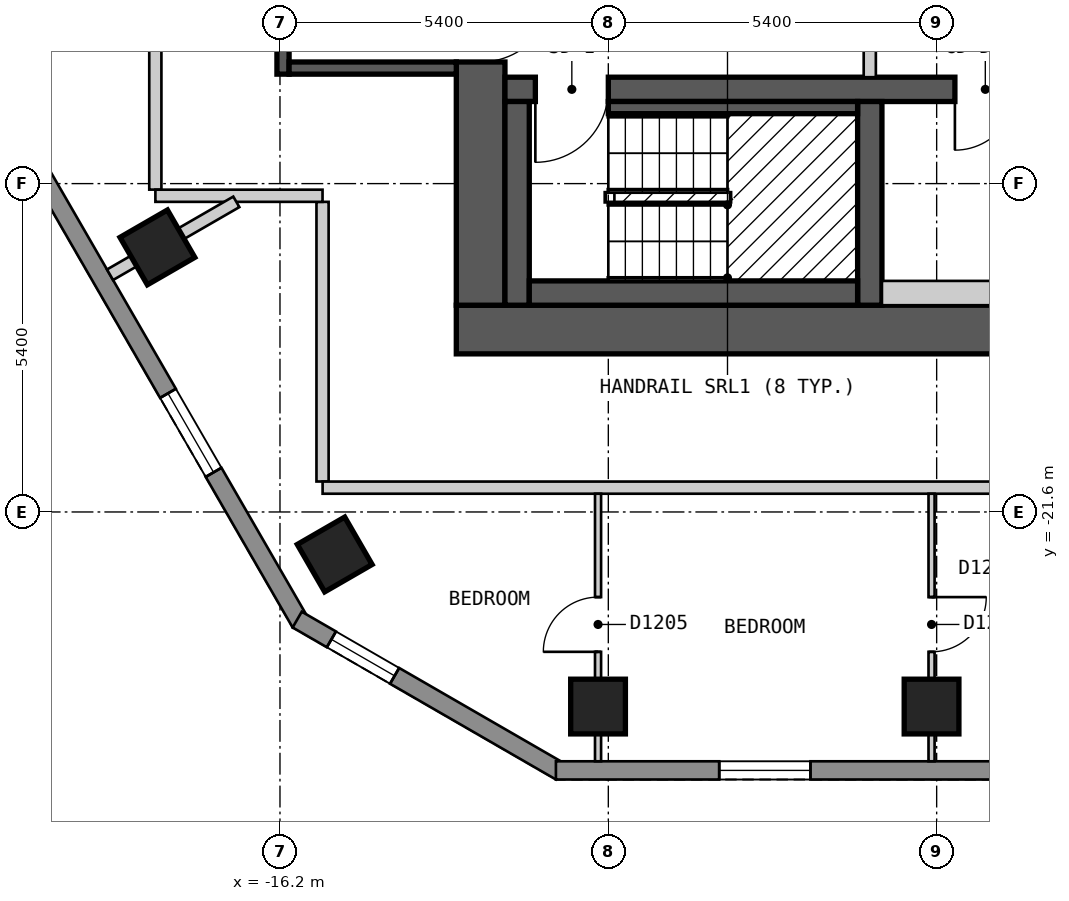
"""IFC4 building model, lengths in metres.
Left out: names, types, materials, properties, quantities, classifications, styles, units other than length and angle.
Written with IfcOpenShell. Run it as: python <this file> out.ifc"""

import sys

from ifc_helpers import new_model, si_unit, direction, frame, frame_2d, origin, origin_2d, place, context, subcontext, project, spatial, polyline, rectangle, outline, extrude, element, fill, save


model = new_model("IFC4")
c1 = context("Model", 3, precision=1e-05, world=origin(), true_north=direction((0.0, 1.0)))
c2 = subcontext(c1, "Body", "Model", "MODEL_VIEW")
j1 = project(units=[si_unit("LENGTHUNIT", "METRE"), si_unit("PLANEANGLEUNIT", "RADIAN")], contexts=[c1])
p1 = place(None, origin())
s1 = spatial("IfcSite", under=j1, at=p1, CompositionType="ELEMENT")
p2 = place(p1, origin())
s2 = spatial("IfcBuilding", under=s1, at=p2, CompositionType="ELEMENT")
p3 = place(p2, frame((0.0, 0.0, 129.6)))
s3 = spatial("IfcBuildingStorey", under=s2, at=p3, CompositionType="ELEMENT", Elevation=129.6)
for number, where, z_axis, x_axis in (
    (1, (-18.216, -17.249, 0.0), (0.0, 0.0, 1.0), (0.5, -0.866, 0.0)),
    (2, (-15.3, -22.299, 0.0), (0.0, 0.0, 1.0), (0.5, -0.866, 0.0)),
    (3, (-10.969, -24.8, 0.0), (0.0, 0.0, 1.0), (1.0, 0.0, 0.0)),
    (4, (-5.484, -24.8, 0.0), (0.0, 0.0, 1.0), (1.0, 0.0, 0.0)),
):
    element("IfcColumn", number, at=place(p3, frame(where, z_axis=z_axis, x_axis=x_axis)), inside=s3, PredefinedType="COLUMN", context=c2, shape_type="SweptSolid", body=[
        extrude(rectangle(XDim=0.9, YDim=0.9, at=origin_2d()), origin(), (0.0, 0.0, 1.0), 3.0),
    ])
p4 = place(p3, frame((-13.3, -18.6, 0.0), z_axis=(0.0, 0.0, 1.0), x_axis=(1.0, 0.0, 0.0)))
e5 = element("IfcWall", 5, at=p4, inside=s3, PredefinedType="SHEAR", context=c2, shape_type="SweptSolid", body=[
    extrude(rectangle(XDim=26.6, YDim=0.8, at=frame_2d((13.3, 0.0))), origin(), (0.0, 0.0, 1.0), 2.7),
])
p5 = place(p3, frame((-12.9, -18.2, 0.0), z_axis=(0.0, 0.0, 1.0), x_axis=(0.0, 1.0, 0.0)))
e6 = element("IfcWall", 6, at=p5, inside=s3, PredefinedType="SHEAR", context=c2, shape_type="SweptSolid", body=[
    extrude(rectangle(XDim=12.4, YDim=0.8, at=frame_2d((6.2, 0.0))), origin(), (0.0, 0.0, 1.0), 2.7),
])
p6 = place(p5, frame((4.0, 0.0, 0.0)))
e7 = element("IfcOpeningElement", 7, at=p6, cuts=e6, PredefinedType="OPENING", context=c2, shape_type="SweptSolid", body=[
    extrude(rectangle(XDim=1.2, YDim=2.1, at=frame_2d((0.6, 1.05))), frame((0.0, 0.41, 0.0), z_axis=(0.0, -1.0, 0.0), x_axis=(1.0, 0.0, 0.0)), (0.0, 0.0, 1.0), 0.82),
])
p7 = place(p3, frame((-12.5, -14.65, 0.0), z_axis=(0.0, 0.0, 1.0), x_axis=(1.0, 0.0, 0.0)))
e8 = element("IfcWall", 8, at=p7, inside=s3, PredefinedType="SHEAR", context=c2, shape_type="SweptSolid", body=[
    extrude(rectangle(XDim=25.0, YDim=0.4, at=frame_2d((12.5, 0.0))), origin(), (0.0, 0.0, 1.0), 2.7),
])
p8 = place(p7, frame((1.7, 0.0, 0.0), z_axis=(0.0, 0.0, 1.0), x_axis=(-1.0, 0.0, 0.0)))
e9 = element("IfcOpeningElement", 9, at=p8, cuts=e8, PredefinedType="OPENING", context=c2, shape_type="SweptSolid", body=[
    extrude(rectangle(XDim=1.2, YDim=2.1, at=frame_2d((0.6, 1.05))), frame((0.0, 0.21, 0.0), z_axis=(0.0, -1.0, 0.0), x_axis=(1.0, 0.0, 0.0)), (0.0, 0.0, 1.0), 0.42),
])
p9 = place(p7, frame((24.55, 0.0, 0.0), z_axis=(0.0, 0.0, 1.0), x_axis=(-1.0, 0.0, 0.0)))
e10 = element("IfcOpeningElement", 10, at=p9, cuts=e8, PredefinedType="OPENING", context=c2, shape_type="SweptSolid", body=[
    extrude(rectangle(XDim=1.2, YDim=2.1, at=frame_2d((0.6, 1.05))), frame((0.0, 0.21, 0.0), z_axis=(0.0, -1.0, 0.0), x_axis=(1.0, 0.0, 0.0)), (0.0, 0.0, 1.0), 0.42),
])
p10 = place(p7, frame((8.4, 0.0, 0.0), z_axis=(0.0, 0.0, 1.0), x_axis=(-1.0, 0.0, 0.0)))
e11 = element("IfcOpeningElement", 11, at=p10, cuts=e8, PredefinedType="OPENING", context=c2, shape_type="SweptSolid", body=[
    extrude(rectangle(XDim=1.0, YDim=2.1, at=frame_2d((0.5, 1.05))), frame((0.0, 0.21, 0.0), z_axis=(0.0, -1.0, 0.0), x_axis=(1.0, 0.0, 0.0)), (0.0, 0.0, 1.0), 0.42),
])
p11 = place(p7, frame((11.15, 0.0, 0.0), z_axis=(0.0, 0.0, 1.0), x_axis=(-1.0, 0.0, 0.0)))
e12 = element("IfcOpeningElement", 12, at=p11, cuts=e8, PredefinedType="OPENING", context=c2, shape_type="SweptSolid", body=[
    extrude(rectangle(XDim=0.9, YDim=2.1, at=frame_2d((0.45, 1.05))), frame((0.0, 0.21, 0.0), z_axis=(0.0, -1.0, 0.0), x_axis=(1.0, 0.0, 0.0)), (0.0, 0.0, 1.0), 0.42),
])
p12 = place(p7, frame((13.95, 0.0, 0.0), z_axis=(0.0, 0.0, 1.0), x_axis=(-1.0, 0.0, 0.0)))
e13 = element("IfcOpeningElement", 13, at=p12, cuts=e8, PredefinedType="OPENING", context=c2, shape_type="SweptSolid", body=[
    extrude(rectangle(XDim=1.0, YDim=2.1, at=frame_2d((0.5, 1.05))), frame((0.0, 0.21, 0.0), z_axis=(0.0, -1.0, 0.0), x_axis=(1.0, 0.0, 0.0)), (0.0, 0.0, 1.0), 0.42),
])
p13 = place(p7, frame((17.55, 0.0, 0.0), z_axis=(0.0, 0.0, 1.0), x_axis=(-1.0, 0.0, 0.0)))
e14 = element("IfcOpeningElement", 14, at=p13, cuts=e8, PredefinedType="OPENING", context=c2, shape_type="SweptSolid", body=[
    extrude(rectangle(XDim=1.0, YDim=2.1, at=frame_2d((0.5, 1.05))), frame((0.0, 0.21, 0.0), z_axis=(0.0, -1.0, 0.0), x_axis=(1.0, 0.0, 0.0)), (0.0, 0.0, 1.0), 0.42),
])
p14 = place(p3, frame((-6.5, -18.2, 0.0), z_axis=(0.0, 0.0, 1.0), x_axis=(0.0, 1.0, 0.0)))
e15 = element("IfcWall", 15, at=p14, inside=s3, PredefinedType="SHEAR", context=c2, shape_type="SweptSolid", body=[
    extrude(rectangle(XDim=3.35, YDim=0.4, at=frame_2d((1.675, 0.0))), origin(), (0.0, 0.0, 1.0), 2.7),
])
p15 = place(p3, frame((-28.218, -2.025, 0.0), z_axis=(0.0, 0.0, 1.0), x_axis=(0.500017503135, -0.866015298109, 0.0)))
e16 = element("IfcWall", 16, at=p15, inside=s3, PredefinedType="SOLIDWALL", context=c2, shape_type="SweptSolid", body=[
    extrude(outline(polyline([(0.0, -0.15), (24.711, -0.15), (24.631, 0.15), (0.08, 0.15), (0.0, -0.15)])), origin(), (0.0, 0.0, 1.0), 2.7),
])
p16 = place(p15, frame((2.857, 0.0, 0.15)))
e17 = element("IfcOpeningElement", 17, at=p16, cuts=e16, PredefinedType="OPENING", context=c2, shape_type="SweptSolid", body=[
    extrude(rectangle(XDim=1.5, YDim=2.1, at=frame_2d((0.75, 1.05))), frame((0.0, 0.16, 0.0), z_axis=(0.0, -1.0, 0.0), x_axis=(1.0, 0.0, 0.0)), (0.0, 0.0, 1.0), 0.32),
])
p17 = place(p15, frame((8.689, 0.0, 0.15)))
e18 = element("IfcOpeningElement", 18, at=p17, cuts=e16, PredefinedType="OPENING", context=c2, shape_type="SweptSolid", body=[
    extrude(rectangle(XDim=1.5, YDim=2.1, at=frame_2d((0.75, 1.05))), frame((0.0, 0.16, 0.0), z_axis=(0.0, -1.0, 0.0), x_axis=(1.0, 0.0, 0.0)), (0.0, 0.0, 1.0), 0.32),
])
p18 = place(p15, frame((14.52, 0.0, 0.15)))
e19 = element("IfcOpeningElement", 19, at=p18, cuts=e16, PredefinedType="OPENING", context=c2, shape_type="SweptSolid", body=[
    extrude(rectangle(XDim=1.5, YDim=2.1, at=frame_2d((0.75, 1.05))), frame((0.0, 0.16, 0.0), z_axis=(0.0, -1.0, 0.0), x_axis=(1.0, 0.0, 0.0)), (0.0, 0.0, 1.0), 0.32),
])
p19 = place(p15, frame((20.351, 0.0, 0.15)))
e20 = element("IfcOpeningElement", 20, at=p19, cuts=e16, PredefinedType="OPENING", context=c2, shape_type="SweptSolid", body=[
    extrude(rectangle(XDim=1.5, YDim=2.1, at=frame_2d((0.75, 1.05))), frame((0.0, 0.16, 0.0), z_axis=(0.0, -1.0, 0.0), x_axis=(1.0, 0.0, 0.0)), (0.0, 0.0, 1.0), 0.32),
])
p20 = place(p3, frame((-15.917, -23.37, 0.0), z_axis=(0.0, 0.0, 1.0), x_axis=(0.866022959057, -0.500004234368, 0.0)))
e21 = element("IfcWall", 21, at=p20, inside=s3, PredefinedType="SOLIDWALL", context=c2, shape_type="SweptSolid", body=[
    extrude(outline(polyline([(0.0, -0.15), (5.0, -0.15), (4.92, 0.15), (0.08, 0.15), (0.0, -0.15)])), origin(), (0.0, 0.0, 1.0), 2.7),
])
p21 = place(p20, frame((0.65, 0.0, 0.15)))
e22 = element("IfcOpeningElement", 22, at=p21, cuts=e21, PredefinedType="OPENING", context=c2, shape_type="SweptSolid", body=[
    extrude(rectangle(XDim=1.2, YDim=2.1, at=frame_2d((0.6, 1.05))), frame((0.0, 0.16, 0.0), z_axis=(0.0, -1.0, 0.0), x_axis=(1.0, 0.0, 0.0)), (0.0, 0.0, 1.0), 0.32),
])
p22 = place(p3, frame((-11.662, -25.85, 0.0), z_axis=(0.0, 0.0, 1.0), x_axis=(1.0, 0.0, 0.0)))
e23 = element("IfcWall", 23, at=p22, inside=s3, PredefinedType="SOLIDWALL", context=c2, shape_type="SweptSolid", body=[
    extrude(outline(polyline([(0.0, -0.15), (23.324, -0.15), (23.244, 0.15), (0.08, 0.15), (0.0, -0.15)])), origin(), (0.0, 0.0, 1.0), 2.7),
])
p23 = place(p22, frame((2.686, 0.0, 0.15)))
e24 = element("IfcOpeningElement", 24, at=p23, cuts=e23, PredefinedType="OPENING", context=c2, shape_type="SweptSolid", body=[
    extrude(rectangle(XDim=1.5, YDim=2.1, at=frame_2d((0.75, 1.05))), frame((0.0, 0.16, 0.0), z_axis=(0.0, -1.0, 0.0), x_axis=(1.0, 0.0, 0.0)), (0.0, 0.0, 1.0), 0.32),
])
p24 = place(p22, frame((8.17, 0.0, 0.15)))
e25 = element("IfcOpeningElement", 25, at=p24, cuts=e23, PredefinedType="OPENING", context=c2, shape_type="SweptSolid", body=[
    extrude(rectangle(XDim=1.5, YDim=2.1, at=frame_2d((0.75, 1.05))), frame((0.0, 0.16, 0.0), z_axis=(0.0, -1.0, 0.0), x_axis=(1.0, 0.0, 0.0)), (0.0, 0.0, 1.0), 0.32),
])
p25 = place(p22, frame((13.656, 0.0, 0.15)))
e26 = element("IfcOpeningElement", 26, at=p25, cuts=e23, PredefinedType="OPENING", context=c2, shape_type="SweptSolid", body=[
    extrude(rectangle(XDim=1.5, YDim=2.1, at=frame_2d((0.75, 1.05))), frame((0.0, 0.16, 0.0), z_axis=(0.0, -1.0, 0.0), x_axis=(1.0, 0.0, 0.0)), (0.0, 0.0, 1.0), 0.32),
])
p26 = place(p22, frame((19.141, 0.0, 0.15)))
e27 = element("IfcOpeningElement", 27, at=p26, cuts=e23, PredefinedType="OPENING", context=c2, shape_type="SweptSolid", body=[
    extrude(rectangle(XDim=1.5, YDim=2.1, at=frame_2d((0.75, 1.05))), frame((0.0, 0.16, 0.0), z_axis=(0.0, -1.0, 0.0), x_axis=(1.0, 0.0, 0.0)), (0.0, 0.0, 1.0), 0.32),
])
p27 = place(p3, frame((-15.5, -16.5, 0.0), z_axis=(0.0, 0.0, 1.0), x_axis=(0.0, -1.0, 0.0)))
e28 = element("IfcWall", 28, at=p27, inside=s3, PredefinedType="PARTITIONING", context=c2, shape_type="SweptSolid", body=[
    extrude(rectangle(XDim=4.599, YDim=0.2, at=frame_2d((2.3, 0.0))), origin(), (0.0, 0.0, 1.0), 2.7),
])
p28 = place(p3, frame((-18.25, -10.593, 0.0), z_axis=(0.0, 0.0, 1.0), x_axis=(0.0, -1.0, 0.0)))
e29 = element("IfcWall", 29, at=p28, inside=s3, PredefinedType="PARTITIONING", context=c2, shape_type="SweptSolid", body=[
    extrude(rectangle(XDim=5.706, YDim=0.2, at=frame_2d((2.853, 0.0))), origin(), (0.0, 0.0, 1.0), 2.7),
])
p29 = place(p3, frame((-18.249, -16.4, 0.0), z_axis=(0.0, 0.0, 1.0), x_axis=(1.0, 0.0, 0.0)))
e30 = element("IfcWall", 30, at=p29, inside=s3, PredefinedType="PARTITIONING", context=c2, shape_type="SweptSolid", body=[
    extrude(rectangle(XDim=2.749, YDim=0.2, at=frame_2d((1.375, 0.0))), origin(), (0.0, 0.0, 1.0), 2.7),
])
p30 = place(p3, frame((-15.499, -21.2, 0.0), z_axis=(0.0, 0.0, 1.0), x_axis=(1.0, 0.0, 0.0)))
e31 = element("IfcWall", 31, at=p30, inside=s3, PredefinedType="PARTITIONING", context=c2, shape_type="SweptSolid", body=[
    extrude(rectangle(XDim=30.898, YDim=0.2, at=frame_2d((15.449, 0.0))), origin(), (0.0, 0.0, 1.0), 2.7),
])
p31 = place(p30, frame((12.258, 0.0, 0.0)))
e32 = element("IfcOpeningElement", 32, at=p31, cuts=e31, PredefinedType="OPENING", context=c2, shape_type="SweptSolid", body=[
    extrude(rectangle(XDim=1.0, YDim=2.1, at=frame_2d((0.5, 1.05))), frame((0.0, 0.11, 0.0), z_axis=(0.0, -1.0, 0.0), x_axis=(1.0, 0.0, 0.0)), (0.0, 0.0, 1.0), 0.22),
])
p32 = place(p30, frame((23.228, 0.0, 0.0)))
e33 = element("IfcOpeningElement", 33, at=p32, cuts=e31, PredefinedType="OPENING", context=c2, shape_type="SweptSolid", body=[
    extrude(rectangle(XDim=1.0, YDim=2.1, at=frame_2d((0.5, 1.05))), frame((0.0, 0.11, 0.0), z_axis=(0.0, -1.0, 0.0), x_axis=(1.0, 0.0, 0.0)), (0.0, 0.0, 1.0), 0.22),
])
p33 = place(p3, frame((-5.484, -25.7, 0.0), z_axis=(0.0, 0.0, 1.0), x_axis=(0.0, 1.0, 0.0)))
e34 = element("IfcWall", 34, at=p33, inside=s3, PredefinedType="PARTITIONING", context=c2, shape_type="SweptSolid", body=[
    extrude(rectangle(XDim=4.4, YDim=0.1, at=frame_2d((2.2, 0.0))), origin(), (0.0, 0.0, 1.0), 2.7),
])
p34 = place(p33, frame((1.8, 0.0, 0.0)))
e35 = element("IfcOpeningElement", 35, at=p34, cuts=e34, PredefinedType="OPENING", context=c2, shape_type="SweptSolid", body=[
    extrude(rectangle(XDim=0.9, YDim=2.1, at=frame_2d((0.45, 1.05))), frame((0.0, 0.06, 0.0), z_axis=(0.0, -1.0, 0.0), x_axis=(1.0, 0.0, 0.0)), (0.0, 0.0, 1.0), 0.12),
])
p35 = place(p3, frame((-10.969, -25.7, 0.0), z_axis=(0.0, 0.0, 1.0), x_axis=(0.0, 1.0, 0.0)))
e36 = element("IfcWall", 36, at=p35, inside=s3, PredefinedType="PARTITIONING", context=c2, shape_type="SweptSolid", body=[
    extrude(rectangle(XDim=4.4, YDim=0.1, at=frame_2d((2.2, 0.0))), origin(), (0.0, 0.0, 1.0), 2.7),
])
p36 = place(p35, frame((1.8, 0.0, 0.0)))
e37 = element("IfcOpeningElement", 37, at=p36, cuts=e36, PredefinedType="OPENING", context=c2, shape_type="SweptSolid", body=[
    extrude(rectangle(XDim=0.9, YDim=2.1, at=frame_2d((0.45, 1.05))), frame((0.0, 0.06, 0.0), z_axis=(0.0, -1.0, 0.0), x_axis=(1.0, 0.0, 0.0)), (0.0, 0.0, 1.0), 0.12),
])
p37 = place(p3, frame((-18.995, -17.699, 0.0), z_axis=(0.0, 0.0, 1.0), x_axis=(0.86607371389, 0.499916315105, 0.0)))
e38 = element("IfcWall", 38, at=p37, inside=s3, PredefinedType="PARTITIONING", context=c2, shape_type="SweptSolid", body=[
    extrude(rectangle(XDim=2.398, YDim=0.2, at=frame_2d((1.199, 0.0))), origin(), (0.0, 0.0, 1.0), 2.7),
])
p38 = place(p3, frame((-16.15, -14.4, 0.0), z_axis=(0.0, 0.0, 1.0), x_axis=(0.0, 1.0, 0.0)))
e39 = element("IfcWall", 39, at=p38, inside=s3, PredefinedType="SOLIDWALL", context=c2, shape_type="SweptSolid", body=[
    extrude(rectangle(XDim=5.8, YDim=0.2, at=frame_2d((2.9, 0.0))), origin(), (0.0, 0.0, 1.0), 2.7),
])
p39 = place(p3, frame((-16.05, -14.3, 0.0), z_axis=(0.0, 0.0, 1.0), x_axis=(1.0, 0.0, 0.0)))
e40 = element("IfcWall", 40, at=p39, inside=s3, PredefinedType="SOLIDWALL", context=c2, shape_type="SweptSolid", body=[
    extrude(rectangle(XDim=2.75, YDim=0.2, at=frame_2d((1.375, 0.0))), origin(), (0.0, 0.0, 1.0), 2.7),
])
p40 = place(p3, frame((-12.3, -18.2, 0.0), z_axis=(0.0, 0.0, 1.0), x_axis=(0.0, 1.0, 0.0)))
e41 = element("IfcWall", 41, at=p40, inside=s3, PredefinedType="SOLIDWALL", context=c2, shape_type="SweptSolid", body=[
    extrude(rectangle(XDim=3.35, YDim=0.4, at=frame_2d((1.675, 0.0))), origin(), (0.0, 0.0, 1.0), 2.7),
])
p41 = place(p3, frame((-12.1, -18.0, 0.0), z_axis=(0.0, 0.0, 1.0), x_axis=(1.0, 0.0, 0.0)))
e42 = element("IfcWall", 42, at=p41, inside=s3, PredefinedType="SOLIDWALL", context=c2, shape_type="SweptSolid", body=[
    extrude(rectangle(XDim=5.4, YDim=0.4, at=frame_2d((2.7, 0.0))), origin(), (0.0, 0.0, 1.0), 2.7),
])
p42 = place(p3, frame((-10.8, -14.95, 0.0), z_axis=(0.0, 0.0, 1.0), x_axis=(1.0, 0.0, 0.0)))
e43 = element("IfcWall", 43, at=p42, inside=s3, PredefinedType="SOLIDWALL", context=c2, shape_type="SweptSolid", body=[
    extrude(rectangle(XDim=4.1, YDim=0.2, at=frame_2d((2.05, 0.0))), origin(), (0.0, 0.0, 1.0), 2.7),
])
p43 = place(p3, frame((-6.5, -14.45, 0.0), z_axis=(0.0, 0.0, 1.0), x_axis=(0.0, 1.0, 0.0)))
e44 = element("IfcWall", 44, at=p43, inside=s3, PredefinedType="PARTITIONING", context=c2, shape_type="SweptSolid", body=[
    extrude(rectangle(XDim=4.9, YDim=0.2, at=frame_2d((2.45, 0.0))), origin(), (0.0, 0.0, 1.0), 2.7),
])
p44 = place(p43, frame((3.15, 0.0, 0.0), z_axis=(0.0, 0.0, 1.0), x_axis=(-1.0, 0.0, 0.0)))
e45 = element("IfcOpeningElement", 45, at=p44, cuts=e44, PredefinedType="OPENING", context=c2, shape_type="SweptSolid", body=[
    extrude(rectangle(XDim=1.4, YDim=2.1, at=frame_2d((0.7, 1.05))), frame((0.0, 0.11, 0.0), z_axis=(0.0, -1.0, 0.0), x_axis=(1.0, 0.0, 0.0)), (0.0, 0.0, 1.0), 0.22),
])
p45 = place(p3, frame((-6.3, -18.0, 0.0), z_axis=(0.0, 0.0, 1.0), x_axis=(1.0, 0.0, 0.0)))
e46 = element("IfcWall", 46, at=p45, inside=s3, PredefinedType="PARTITIONING", context=c2, shape_type="SweptSolid", body=[
    extrude(rectangle(XDim=12.6, YDim=0.4, at=frame_2d((6.3, 0.0))), origin(), (0.0, 0.0, 1.0), 2.7),
])
p46 = place(p19, origin())
e47 = element("IfcWindow", 47, at=p46, inside=s3, PartitioningType="SINGLE_PANEL", PredefinedType="WINDOW", context=c2, shape_type="SweptSolid", body=[
    extrude(rectangle(XDim=1.5, YDim=2.1, at=frame_2d((0.75, 1.05))), frame((0.0, 0.03, 0.0), z_axis=(0.0, -1.0, 0.0), x_axis=(1.0, 0.0, 0.0)), (0.0, 0.0, 1.0), 0.06),
])
fill(e20, e47)
p47 = place(p21, origin())
e48 = element("IfcWindow", 48, at=p47, inside=s3, PartitioningType="SINGLE_PANEL", PredefinedType="WINDOW", context=c2, shape_type="SweptSolid", body=[
    extrude(rectangle(XDim=1.2, YDim=2.1, at=frame_2d((0.6, 1.05))), frame((0.0, 0.03, 0.0), z_axis=(0.0, -1.0, 0.0), x_axis=(1.0, 0.0, 0.0)), (0.0, 0.0, 1.0), 0.06),
])
fill(e22, e48)
p48 = place(p23, origin())
e49 = element("IfcWindow", 49, at=p48, inside=s3, PartitioningType="SINGLE_PANEL", PredefinedType="WINDOW", context=c2, shape_type="SweptSolid", body=[
    extrude(rectangle(XDim=1.5, YDim=2.1, at=frame_2d((0.75, 1.05))), frame((0.0, 0.03, 0.0), z_axis=(0.0, -1.0, 0.0), x_axis=(1.0, 0.0, 0.0)), (0.0, 0.0, 1.0), 0.06),
])
fill(e24, e49)
p49 = place(p34, origin())
e50 = element("IfcDoor", 50, at=p49, inside=s3, OperationType="SINGLE_SWING_RIGHT", PredefinedType="DOOR", context=c2, shape_type="SweptSolid", body=[
    extrude(rectangle(XDim=0.9, YDim=2.1, at=frame_2d((0.45, 1.05))), frame((0.0, 0.025, 0.0), z_axis=(0.0, -1.0, 0.0), x_axis=(1.0, 0.0, 0.0)), (0.0, 0.0, 1.0), 0.05),
])
fill(e35, e50)
p50 = place(p36, origin())
e51 = element("IfcDoor", 51, at=p50, inside=s3, OperationType="SINGLE_SWING_LEFT", PredefinedType="DOOR", context=c2, shape_type="SweptSolid", body=[
    extrude(rectangle(XDim=0.9, YDim=2.1, at=frame_2d((0.45, 1.05))), frame((0.0, 0.025, 0.0), z_axis=(0.0, -1.0, 0.0), x_axis=(1.0, 0.0, 0.0)), (0.0, 0.0, 1.0), 0.05),
])
fill(e37, e51)
p51 = place(p8, origin())
e52 = element("IfcDoor", 52, at=p51, inside=s3, OperationType="SINGLE_SWING_RIGHT", PredefinedType="DOOR", context=c2, shape_type="SweptSolid", body=[
    extrude(rectangle(XDim=1.2, YDim=2.1, at=frame_2d((0.6, 1.05))), frame((0.0, 0.025, 0.0), z_axis=(0.0, -1.0, 0.0), x_axis=(1.0, 0.0, 0.0)), (0.0, 0.0, 1.0), 0.05),
])
fill(e9, e52)
p52 = place(p6, origin())
e53 = element("IfcDoor", 53, at=p52, inside=s3, OperationType="SINGLE_SWING_RIGHT", PredefinedType="DOOR", context=c2, shape_type="SweptSolid", body=[
    extrude(rectangle(XDim=1.2, YDim=2.1, at=frame_2d((0.6, 1.05))), frame((0.0, 0.025, 0.0), z_axis=(0.0, -1.0, 0.0), x_axis=(1.0, 0.0, 0.0)), (0.0, 0.0, 1.0), 0.05),
])
fill(e7, e53)
p53 = place(p10, origin())
e54 = element("IfcDoor", 54, at=p53, inside=s3, OperationType="SINGLE_SWING_RIGHT", PredefinedType="DOOR", context=c2, shape_type="SweptSolid", body=[
    extrude(rectangle(XDim=1.0, YDim=2.1, at=frame_2d((0.5, 1.05))), frame((0.0, 0.025, 0.0), z_axis=(0.0, -1.0, 0.0), x_axis=(1.0, 0.0, 0.0)), (0.0, 0.0, 1.0), 0.05),
])
fill(e11, e54)
save(model, sys.argv[1])
